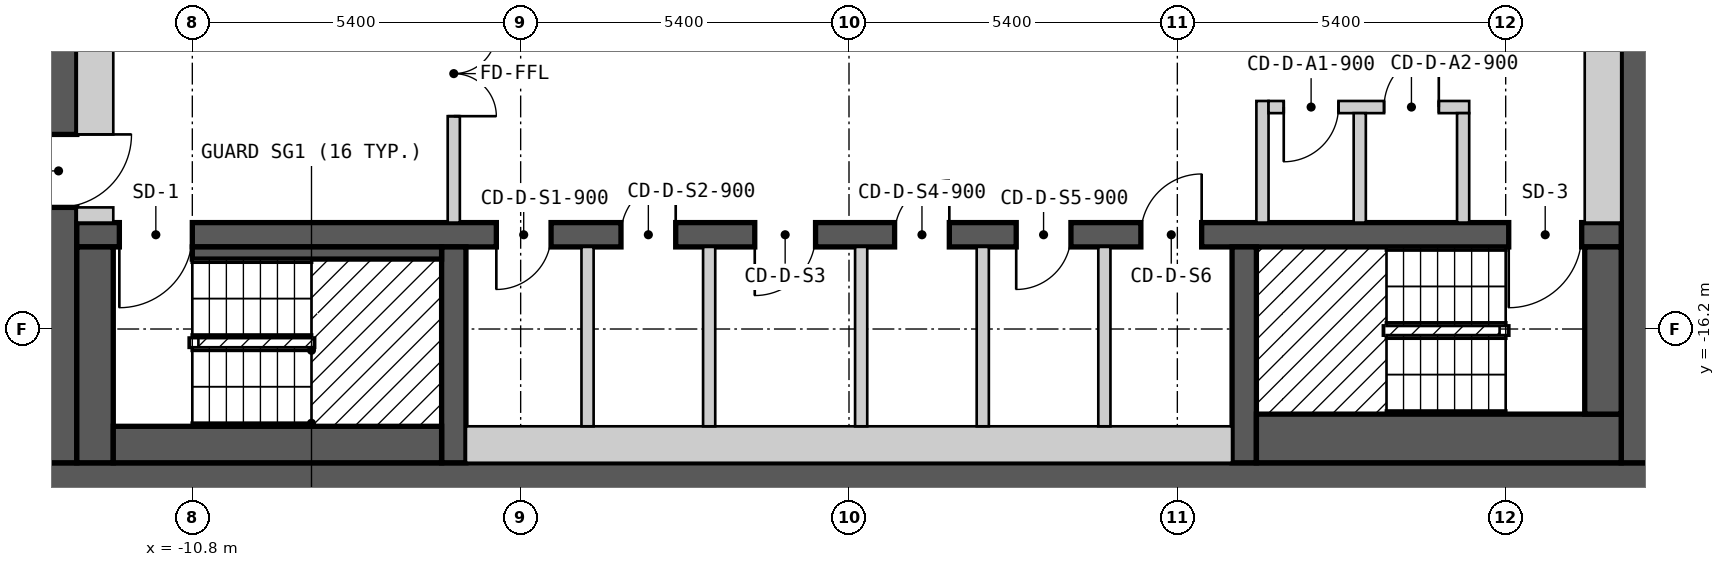
"""IFC4 building model, lengths in metres.
Left out: names, types, materials, properties, quantities, classifications, styles, units other than length and angle.
Written with IfcOpenShell. Run it as: python <this file> out.ifc"""

import sys

from ifc_helpers import new_model, si_unit, direction, frame, frame_2d, origin, place, context, subcontext, project, spatial, rectangle, extrude, element, fill, save


model = new_model("IFC4")
c1 = context("Model", 3, precision=1e-05, world=origin(), true_north=direction((0.0, 1.0)))
c2 = subcontext(c1, "Body", "Model", "MODEL_VIEW")
j1 = project(units=[si_unit("LENGTHUNIT", "METRE"), si_unit("PLANEANGLEUNIT", "RADIAN")], contexts=[c1])
p1 = place(None, origin())
s1 = spatial("IfcSite", under=j1, at=p1, CompositionType="ELEMENT")
p2 = place(p1, origin())
s2 = spatial("IfcBuilding", under=s1, at=p2, CompositionType="ELEMENT")
p3 = place(p2, frame((0.0, 0.0, 196.2)))
s3 = spatial("IfcBuildingStorey", under=s2, at=p3, CompositionType="ELEMENT", Elevation=196.2)
p4 = place(p3, frame((-13.3, -18.7, 0.0), z_axis=(0.0, 0.0, 1.0), x_axis=(1.0, 0.0, 0.0)))
e1 = element("IfcWall", 1, at=p4, inside=s3, PredefinedType="SHEAR", context=c2, shape_type="SweptSolid", body=[
    extrude(rectangle(XDim=26.6, YDim=0.6, at=frame_2d((13.3, 0.0))), origin(), (0.0, 0.0, 1.0), 2.6),
])
p5 = place(p3, frame((-13.0, -18.4, 0.0), z_axis=(0.0, 0.0, 1.0), x_axis=(0.0, 1.0, 0.0)))
e2 = element("IfcWall", 2, at=p5, inside=s3, PredefinedType="SHEAR", context=c2, shape_type="SweptSolid", body=[
    extrude(rectangle(XDim=12.8, YDim=0.6, at=frame_2d((6.4, 0.0))), origin(), (0.0, 0.0, 1.0), 2.6),
])
p6 = place(p5, frame((4.2, 0.0, 0.0)))
e3 = element("IfcOpeningElement", 3, at=p6, cuts=e2, PredefinedType="OPENING", context=c2, shape_type="SweptSolid", body=[
    extrude(rectangle(XDim=1.2, YDim=2.1, at=frame_2d((0.6, 1.05))), frame((0.0, 0.31, 0.0), z_axis=(0.0, -1.0, 0.0), x_axis=(1.0, 0.0, 0.0)), (0.0, 0.0, 1.0), 0.62),
])
p7 = place(p3, frame((13.0, -18.4, 0.0), z_axis=(0.0, 0.0, 1.0), x_axis=(0.0, 1.0, 0.0)))
e4 = element("IfcWall", 4, at=p7, inside=s3, PredefinedType="SHEAR", context=c2, shape_type="SweptSolid", body=[
    extrude(rectangle(XDim=12.8, YDim=0.6, at=frame_2d((6.4, 0.0))), origin(), (0.0, 0.0, 1.0), 2.6),
])
p8 = place(p3, frame((-12.7, -14.65, 0.0), z_axis=(0.0, 0.0, 1.0), x_axis=(1.0, 0.0, 0.0)))
e5 = element("IfcWall", 5, at=p8, inside=s3, PredefinedType="SHEAR", context=c2, shape_type="SweptSolid", body=[
    extrude(rectangle(XDim=25.4, YDim=0.4, at=frame_2d((12.7, 0.0))), origin(), (0.0, 0.0, 1.0), 2.6),
])
p9 = place(p8, frame((1.9, 0.0, 0.0), z_axis=(0.0, 0.0, 1.0), x_axis=(-1.0, 0.0, 0.0)))
e6 = element("IfcOpeningElement", 6, at=p9, cuts=e5, PredefinedType="OPENING", context=c2, shape_type="SweptSolid", body=[
    extrude(rectangle(XDim=1.2, YDim=2.1, at=frame_2d((0.6, 1.05))), frame((0.0, 0.21, 0.0), z_axis=(0.0, -1.0, 0.0), x_axis=(1.0, 0.0, 0.0)), (0.0, 0.0, 1.0), 0.42),
])
p10 = place(p8, frame((24.75, 0.0, 0.0), z_axis=(0.0, 0.0, 1.0), x_axis=(-1.0, 0.0, 0.0)))
e7 = element("IfcOpeningElement", 7, at=p10, cuts=e5, PredefinedType="OPENING", context=c2, shape_type="SweptSolid", body=[
    extrude(rectangle(XDim=1.2, YDim=2.1, at=frame_2d((0.6, 1.05))), frame((0.0, 0.21, 0.0), z_axis=(0.0, -1.0, 0.0), x_axis=(1.0, 0.0, 0.0)), (0.0, 0.0, 1.0), 0.42),
])
p11 = place(p8, frame((7.8, 0.0, 0.0), z_axis=(0.0, 0.0, 1.0), x_axis=(-1.0, 0.0, 0.0)))
e8 = element("IfcOpeningElement", 8, at=p11, cuts=e5, PredefinedType="OPENING", context=c2, shape_type="SweptSolid", body=[
    extrude(rectangle(XDim=0.9, YDim=2.1, at=frame_2d((0.45, 1.05))), frame((0.0, 0.21, 0.0), z_axis=(0.0, -1.0, 0.0), x_axis=(1.0, 0.0, 0.0)), (0.0, 0.0, 1.0), 0.42),
])
p12 = place(p8, frame((9.85, 0.0, 0.0), z_axis=(0.0, 0.0, 1.0), x_axis=(-1.0, 0.0, 0.0)))
e9 = element("IfcOpeningElement", 9, at=p12, cuts=e5, PredefinedType="OPENING", context=c2, shape_type="SweptSolid", body=[
    extrude(rectangle(XDim=0.9, YDim=2.1, at=frame_2d((0.45, 1.05))), frame((0.0, 0.21, 0.0), z_axis=(0.0, -1.0, 0.0), x_axis=(1.0, 0.0, 0.0)), (0.0, 0.0, 1.0), 0.42),
])
p13 = place(p8, frame((12.15, 0.0, 0.0), z_axis=(0.0, 0.0, 1.0), x_axis=(-1.0, 0.0, 0.0)))
e10 = element("IfcOpeningElement", 10, at=p13, cuts=e5, PredefinedType="OPENING", context=c2, shape_type="SweptSolid", body=[
    extrude(rectangle(XDim=1.0, YDim=2.1, at=frame_2d((0.5, 1.05))), frame((0.0, 0.21, 0.0), z_axis=(0.0, -1.0, 0.0), x_axis=(1.0, 0.0, 0.0)), (0.0, 0.0, 1.0), 0.42),
])
p14 = place(p8, frame((14.35, 0.0, 0.0), z_axis=(0.0, 0.0, 1.0), x_axis=(-1.0, 0.0, 0.0)))
e11 = element("IfcOpeningElement", 11, at=p14, cuts=e5, PredefinedType="OPENING", context=c2, shape_type="SweptSolid", body=[
    extrude(rectangle(XDim=0.9, YDim=2.1, at=frame_2d((0.45, 1.05))), frame((0.0, 0.21, 0.0), z_axis=(0.0, -1.0, 0.0), x_axis=(1.0, 0.0, 0.0)), (0.0, 0.0, 1.0), 0.42),
])
p15 = place(p8, frame((16.35, 0.0, 0.0), z_axis=(0.0, 0.0, 1.0), x_axis=(-1.0, 0.0, 0.0)))
e12 = element("IfcOpeningElement", 12, at=p15, cuts=e5, PredefinedType="OPENING", context=c2, shape_type="SweptSolid", body=[
    extrude(rectangle(XDim=0.9, YDim=2.1, at=frame_2d((0.45, 1.05))), frame((0.0, 0.21, 0.0), z_axis=(0.0, -1.0, 0.0), x_axis=(1.0, 0.0, 0.0)), (0.0, 0.0, 1.0), 0.42),
])
p16 = place(p8, frame((18.5, 0.0, 0.0), z_axis=(0.0, 0.0, 1.0), x_axis=(-1.0, 0.0, 0.0)))
e13 = element("IfcOpeningElement", 13, at=p16, cuts=e5, PredefinedType="OPENING", context=c2, shape_type="SweptSolid", body=[
    extrude(rectangle(XDim=1.0, YDim=2.1, at=frame_2d((0.5, 1.05))), frame((0.0, 0.21, 0.0), z_axis=(0.0, -1.0, 0.0), x_axis=(1.0, 0.0, 0.0)), (0.0, 0.0, 1.0), 0.42),
])
for number, where, z_axis, x_axis in (
    (14, (-6.5, -18.4, 0.0), (0.0, 0.0, 1.0), (0.0, 1.0, 0.0)),
    (15, (6.5, -18.4, 0.0), (0.0, 0.0, 1.0), (0.0, 1.0, 0.0)),
):
    element("IfcWall", number, at=place(p3, frame(where, z_axis=z_axis, x_axis=x_axis)), inside=s3, PredefinedType="SHEAR", context=c2, shape_type="SweptSolid", body=[
        extrude(rectangle(XDim=3.55, YDim=0.4, at=frame_2d((1.775, 0.0))), origin(), (0.0, 0.0, 1.0), 2.6),
    ])
p17 = place(p3, frame((-12.4, -18.4, 0.0), z_axis=(0.0, 0.0, 1.0), x_axis=(0.0, 1.0, 0.0)))
e16 = element("IfcWall", 16, at=p17, inside=s3, PredefinedType="SOLIDWALL", context=c2, shape_type="SweptSolid", body=[
    extrude(rectangle(XDim=3.55, YDim=0.6, at=frame_2d((1.775, 0.0))), origin(), (0.0, 0.0, 1.0), 2.6),
])
p18 = place(p3, frame((-12.7, -14.325, 0.0), z_axis=(0.0, 0.0, 1.0), x_axis=(1.0, 0.0, 0.0)))
e17 = element("IfcWall", 17, at=p18, inside=s3, PredefinedType="PARTITIONING", context=c2, shape_type="SweptSolid", body=[
    extrude(rectangle(XDim=0.6, YDim=0.25, at=frame_2d((0.3, 0.0))), origin(), (0.0, 0.0, 1.0), 2.6),
])
p19 = place(p3, frame((-12.4, -13.0, 0.0), z_axis=(0.0, 0.0, 1.0), x_axis=(0.0, 1.0, 0.0)))
e18 = element("IfcWall", 18, at=p19, inside=s3, PredefinedType="PARTITIONING", context=c2, shape_type="SweptSolid", body=[
    extrude(rectangle(XDim=3.45, YDim=0.6, at=frame_2d((1.725, 0.0))), origin(), (0.0, 0.0, 1.0), 2.6),
])
p20 = place(p3, frame((-12.1, -18.1, 0.0), z_axis=(0.0, 0.0, 1.0), x_axis=(1.0, 0.0, 0.0)))
e19 = element("IfcWall", 19, at=p20, inside=s3, PredefinedType="SOLIDWALL", context=c2, shape_type="SweptSolid", body=[
    extrude(rectangle(XDim=5.4, YDim=0.6, at=frame_2d((2.7, 0.0))), origin(), (0.0, 0.0, 1.0), 2.6),
])
p21 = place(p3, frame((-10.8, -14.95, 0.0), z_axis=(0.0, 0.0, 1.0), x_axis=(1.0, 0.0, 0.0)))
e20 = element("IfcWall", 20, at=p21, inside=s3, PredefinedType="SOLIDWALL", context=c2, shape_type="SweptSolid", body=[
    extrude(rectangle(XDim=4.1, YDim=0.2, at=frame_2d((2.05, 0.0))), origin(), (0.0, 0.0, 1.0), 2.6),
])
p22 = place(p3, frame((-6.5, -14.45, 0.0), z_axis=(0.0, 0.0, 1.0), x_axis=(0.0, 1.0, 0.0)))
e21 = element("IfcWall", 21, at=p22, inside=s3, PredefinedType="PARTITIONING", context=c2, shape_type="SweptSolid", body=[
    extrude(rectangle(XDim=4.9, YDim=0.2, at=frame_2d((2.45, 0.0))), origin(), (0.0, 0.0, 1.0), 2.6),
])
p23 = place(p22, frame((3.15, 0.0, 0.0), z_axis=(0.0, 0.0, 1.0), x_axis=(-1.0, 0.0, 0.0)))
e22 = element("IfcOpeningElement", 22, at=p23, cuts=e21, PredefinedType="OPENING", context=c2, shape_type="SweptSolid", body=[
    extrude(rectangle(XDim=1.4, YDim=2.1, at=frame_2d((0.7, 1.05))), frame((0.0, 0.11, 0.0), z_axis=(0.0, -1.0, 0.0), x_axis=(1.0, 0.0, 0.0)), (0.0, 0.0, 1.0), 0.22),
])
p24 = place(p3, frame((-6.3, -18.1, 0.0), z_axis=(0.0, 0.0, 1.0), x_axis=(1.0, 0.0, 0.0)))
e23 = element("IfcWall", 23, at=p24, inside=s3, PredefinedType="PARTITIONING", context=c2, shape_type="SweptSolid", body=[
    extrude(rectangle(XDim=12.6, YDim=0.6, at=frame_2d((6.3, 0.0))), origin(), (0.0, 0.0, 1.0), 2.6),
])
for number, where, z_axis, x_axis in (
    (24, (-4.3, -17.8, 0.0), (0.0, 0.0, 1.0), (0.0, 1.0, 0.0)),
    (25, (-2.3, -17.8, 0.0), (0.0, 0.0, 1.0), (0.0, 1.0, 0.0)),
    (26, (0.2, -17.8, 0.0), (0.0, 0.0, 1.0), (0.0, 1.0, 0.0)),
    (27, (2.2, -17.8, 0.0), (0.0, 0.0, 1.0), (0.0, 1.0, 0.0)),
    (28, (4.2, -17.8, 0.0), (0.0, 0.0, 1.0), (0.0, 1.0, 0.0)),
):
    element("IfcWall", number, at=place(p3, frame(where, z_axis=z_axis, x_axis=x_axis)), inside=s3, PredefinedType="PARTITIONING", context=c2, shape_type="SweptSolid", body=[
        extrude(rectangle(XDim=2.95, YDim=0.2, at=frame_2d((1.475, 0.0))), origin(), (0.0, 0.0, 1.0), 2.6),
    ])
p25 = place(p3, frame((6.7, -18.0, 0.0), z_axis=(0.0, 0.0, 1.0), x_axis=(1.0, 0.0, 0.0)))
e29 = element("IfcWall", 29, at=p25, inside=s3, PredefinedType="SOLIDWALL", context=c2, shape_type="SweptSolid", body=[
    extrude(rectangle(XDim=6.0, YDim=0.8, at=frame_2d((3.0, 0.0))), origin(), (0.0, 0.0, 1.0), 2.6),
])
p26 = place(p3, frame((6.8, -14.45, 0.0), z_axis=(0.0, 0.0, 1.0), x_axis=(0.0, 1.0, 0.0)))
e30 = element("IfcWall", 30, at=p26, inside=s3, PredefinedType="PARTITIONING", context=c2, shape_type="SweptSolid", body=[
    extrude(rectangle(XDim=2.0, YDim=0.2, at=frame_2d((1.0, 0.0))), origin(), (0.0, 0.0, 1.0), 2.6),
])
p27 = place(p3, frame((6.9, -12.55, 0.0), z_axis=(0.0, 0.0, 1.0), x_axis=(1.0, 0.0, 0.0)))
e31 = element("IfcWall", 31, at=p27, inside=s3, PredefinedType="PARTITIONING", context=c2, shape_type="SweptSolid", body=[
    extrude(rectangle(XDim=3.3, YDim=0.2, at=frame_2d((1.65, 0.0))), origin(), (0.0, 0.0, 1.0), 2.6),
])
p28 = place(p27, frame((1.15, 0.0, 0.0), z_axis=(0.0, 0.0, 1.0), x_axis=(-1.0, 0.0, 0.0)))
e32 = element("IfcOpeningElement", 32, at=p28, cuts=e31, PredefinedType="OPENING", context=c2, shape_type="SweptSolid", body=[
    extrude(rectangle(XDim=0.9, YDim=2.1, at=frame_2d((0.45, 1.05))), frame((0.0, 0.11, 0.0), z_axis=(0.0, -1.0, 0.0), x_axis=(1.0, 0.0, 0.0)), (0.0, 0.0, 1.0), 0.22),
])
p29 = place(p27, frame((2.8, 0.0, 0.0), z_axis=(0.0, 0.0, 1.0), x_axis=(-1.0, 0.0, 0.0)))
e33 = element("IfcOpeningElement", 33, at=p29, cuts=e31, PredefinedType="OPENING", context=c2, shape_type="SweptSolid", body=[
    extrude(rectangle(XDim=0.9, YDim=2.1, at=frame_2d((0.45, 1.05))), frame((0.0, 0.11, 0.0), z_axis=(0.0, -1.0, 0.0), x_axis=(1.0, 0.0, 0.0)), (0.0, 0.0, 1.0), 0.22),
])
for number, where, z_axis, x_axis in (
    (34, (8.4, -14.45, 0.0), (0.0, 0.0, 1.0), (0.0, 1.0, 0.0)),
    (35, (10.1, -14.45, 0.0), (0.0, 0.0, 1.0), (0.0, 1.0, 0.0)),
):
    element("IfcWall", number, at=place(p3, frame(where, z_axis=z_axis, x_axis=x_axis)), inside=s3, PredefinedType="PARTITIONING", context=c2, shape_type="SweptSolid", body=[
        extrude(rectangle(XDim=1.8, YDim=0.2, at=frame_2d((0.9, 0.0))), origin(), (0.0, 0.0, 1.0), 2.6),
    ])
p30 = place(p3, frame((12.4, -17.6, 0.0), z_axis=(0.0, 0.0, 1.0), x_axis=(0.0, 1.0, 0.0)))
e36 = element("IfcWall", 36, at=p30, inside=s3, PredefinedType="SOLIDWALL", context=c2, shape_type="SweptSolid", body=[
    extrude(rectangle(XDim=2.75, YDim=0.6, at=frame_2d((1.375, 0.0))), origin(), (0.0, 0.0, 1.0), 2.6),
])
p31 = place(p3, frame((12.4, -14.45, 0.0), z_axis=(0.0, 0.0, 1.0), x_axis=(0.0, 1.0, 0.0)))
e37 = element("IfcWall", 37, at=p31, inside=s3, PredefinedType="PARTITIONING", context=c2, shape_type="SweptSolid", body=[
    extrude(rectangle(XDim=8.25, YDim=0.6, at=frame_2d((4.125, 0.0))), origin(), (0.0, 0.0, 1.0), 2.6),
])
p32 = place(p9, origin())
e38 = element("IfcDoor", 38, at=p32, inside=s3, OperationType="SINGLE_SWING_RIGHT", PredefinedType="DOOR", context=c2, shape_type="SweptSolid", body=[
    extrude(rectangle(XDim=1.2, YDim=2.1, at=frame_2d((0.6, 1.05))), frame((0.0, 0.025, 0.0), z_axis=(0.0, -1.0, 0.0), x_axis=(1.0, 0.0, 0.0)), (0.0, 0.0, 1.0), 0.05),
])
fill(e6, e38)
p33 = place(p10, origin())
e39 = element("IfcDoor", 39, at=p33, inside=s3, OperationType="SINGLE_SWING_RIGHT", PredefinedType="DOOR", context=c2, shape_type="SweptSolid", body=[
    extrude(rectangle(XDim=1.2, YDim=2.1, at=frame_2d((0.6, 1.05))), frame((0.0, 0.025, 0.0), z_axis=(0.0, -1.0, 0.0), x_axis=(1.0, 0.0, 0.0)), (0.0, 0.0, 1.0), 0.05),
])
fill(e7, e39)
p34 = place(p6, origin())
e40 = element("IfcDoor", 40, at=p34, inside=s3, OperationType="SINGLE_SWING_RIGHT", PredefinedType="DOOR", context=c2, shape_type="SweptSolid", body=[
    extrude(rectangle(XDim=1.2, YDim=2.1, at=frame_2d((0.6, 1.05))), frame((0.0, 0.025, 0.0), z_axis=(0.0, -1.0, 0.0), x_axis=(1.0, 0.0, 0.0)), (0.0, 0.0, 1.0), 0.05),
])
fill(e3, e40)
p35 = place(p23, origin())
e41 = element("IfcDoor", 41, at=p35, inside=s3, OperationType="DOUBLE_DOOR_SINGLE_SWING", PredefinedType="DOOR", context=c2, shape_type="SweptSolid", body=[
    extrude(rectangle(XDim=1.4, YDim=2.1, at=frame_2d((0.7, 1.05))), frame((0.0, 0.025, 0.0), z_axis=(0.0, -1.0, 0.0), x_axis=(1.0, 0.0, 0.0)), (0.0, 0.0, 1.0), 0.05),
])
fill(e22, e41)
p36 = place(p28, origin())
e42 = element("IfcDoor", 42, at=p36, inside=s3, OperationType="SINGLE_SWING_RIGHT", PredefinedType="DOOR", context=c2, shape_type="SweptSolid", body=[
    extrude(rectangle(XDim=0.9, YDim=2.1, at=frame_2d((0.45, 1.05))), frame((0.0, 0.025, 0.0), z_axis=(0.0, -1.0, 0.0), x_axis=(1.0, 0.0, 0.0)), (0.0, 0.0, 1.0), 0.05),
])
fill(e32, e42)
p37 = place(p29, origin())
e43 = element("IfcDoor", 43, at=p37, inside=s3, OperationType="SINGLE_SWING_LEFT", PredefinedType="DOOR", context=c2, shape_type="SweptSolid", body=[
    extrude(rectangle(XDim=0.9, YDim=2.1, at=frame_2d((0.45, 1.05))), frame((0.0, 0.025, 0.0), z_axis=(0.0, -1.0, 0.0), x_axis=(1.0, 0.0, 0.0)), (0.0, 0.0, 1.0), 0.05),
])
fill(e33, e43)
p38 = place(p11, origin())
e44 = element("IfcDoor", 44, at=p38, inside=s3, OperationType="SINGLE_SWING_RIGHT", PredefinedType="DOOR", context=c2, shape_type="SweptSolid", body=[
    extrude(rectangle(XDim=0.9, YDim=2.1, at=frame_2d((0.45, 1.05))), frame((0.0, 0.025, 0.0), z_axis=(0.0, -1.0, 0.0), x_axis=(1.0, 0.0, 0.0)), (0.0, 0.0, 1.0), 0.05),
])
fill(e8, e44)
p39 = place(p12, origin())
e45 = element("IfcDoor", 45, at=p39, inside=s3, OperationType="SINGLE_SWING_LEFT", PredefinedType="DOOR", context=c2, shape_type="SweptSolid", body=[
    extrude(rectangle(XDim=0.9, YDim=2.1, at=frame_2d((0.45, 1.05))), frame((0.0, 0.025, 0.0), z_axis=(0.0, -1.0, 0.0), x_axis=(1.0, 0.0, 0.0)), (0.0, 0.0, 1.0), 0.05),
])
fill(e9, e45)
p40 = place(p13, origin())
e46 = element("IfcDoor", 46, at=p40, inside=s3, OperationType="SINGLE_SWING_RIGHT", PredefinedType="DOOR", context=c2, shape_type="SweptSolid", body=[
    extrude(rectangle(XDim=1.0, YDim=2.1, at=frame_2d((0.5, 1.05))), frame((0.0, 0.025, 0.0), z_axis=(0.0, -1.0, 0.0), x_axis=(1.0, 0.0, 0.0)), (0.0, 0.0, 1.0), 0.05),
])
fill(e10, e46)
p41 = place(p14, origin())
e47 = element("IfcDoor", 47, at=p41, inside=s3, OperationType="SINGLE_SWING_LEFT", PredefinedType="DOOR", context=c2, shape_type="SweptSolid", body=[
    extrude(rectangle(XDim=0.9, YDim=2.1, at=frame_2d((0.45, 1.05))), frame((0.0, 0.025, 0.0), z_axis=(0.0, -1.0, 0.0), x_axis=(1.0, 0.0, 0.0)), (0.0, 0.0, 1.0), 0.05),
])
fill(e11, e47)
p42 = place(p15, origin())
e48 = element("IfcDoor", 48, at=p42, inside=s3, OperationType="SINGLE_SWING_RIGHT", PredefinedType="DOOR", context=c2, shape_type="SweptSolid", body=[
    extrude(rectangle(XDim=0.9, YDim=2.1, at=frame_2d((0.45, 1.05))), frame((0.0, 0.025, 0.0), z_axis=(0.0, -1.0, 0.0), x_axis=(1.0, 0.0, 0.0)), (0.0, 0.0, 1.0), 0.05),
])
fill(e12, e48)
p43 = place(p16, origin())
e49 = element("IfcDoor", 49, at=p43, inside=s3, OperationType="SINGLE_SWING_LEFT", PredefinedType="DOOR", context=c2, shape_type="SweptSolid", body=[
    extrude(rectangle(XDim=1.0, YDim=2.1, at=frame_2d((0.5, 1.05))), frame((0.0, 0.025, 0.0), z_axis=(0.0, -1.0, 0.0), x_axis=(1.0, 0.0, 0.0)), (0.0, 0.0, 1.0), 0.05),
])
fill(e13, e49)
save(model, sys.argv[1])
